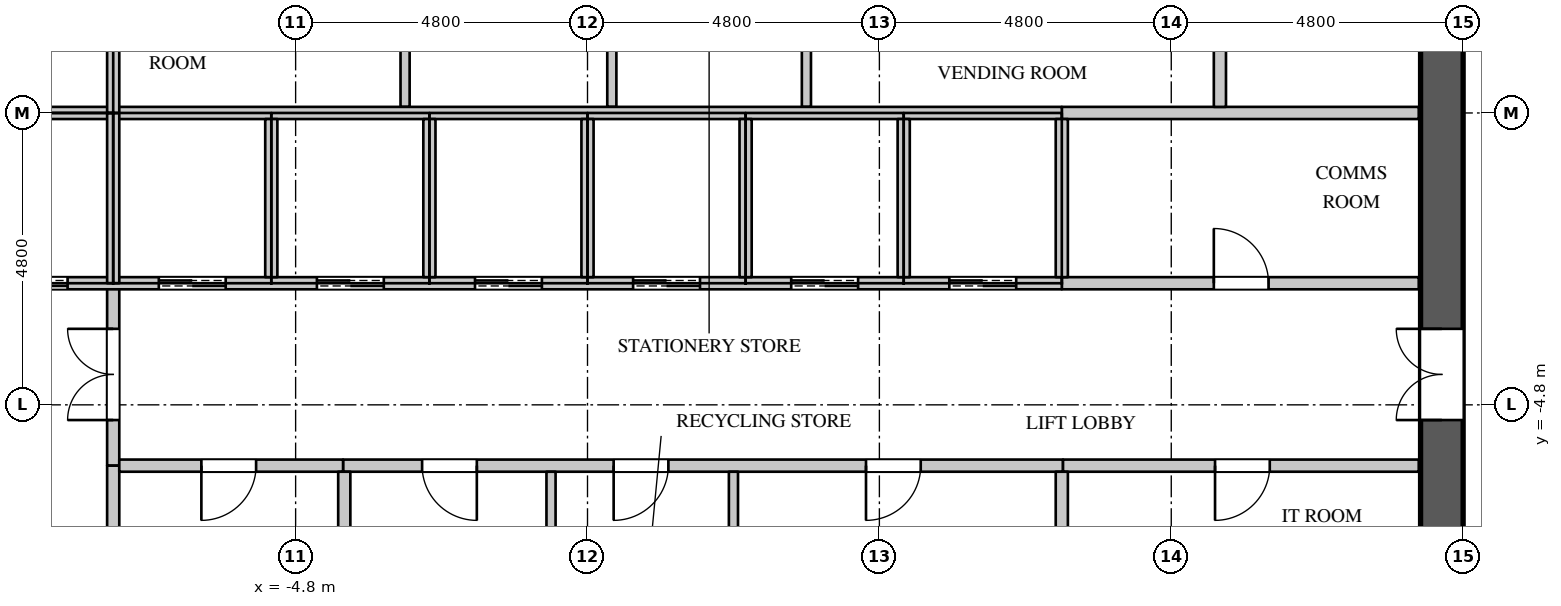
"""IFC4 building model, lengths in metres.
Left out: names, types, materials, properties, quantities, classifications, styles, units other than length and angle.
Written with IfcOpenShell. Run it as: python <this file> out.ifc"""

import sys

from ifc_helpers import new_model, si_unit, direction, frame, frame_2d, origin, place, context, subcontext, project, spatial, rectangle, extrude, element, fill, save


model = new_model("IFC4")
c1 = context("Model", 3, precision=1e-05, world=origin(), true_north=direction((0.0, 1.0)))
c2 = subcontext(c1, "Body", "Model", "MODEL_VIEW")
j1 = project(units=[si_unit("LENGTHUNIT", "METRE"), si_unit("PLANEANGLEUNIT", "RADIAN")], contexts=[c1])
p1 = place(None, origin())
s1 = spatial("IfcSite", under=j1, at=p1, CompositionType="ELEMENT")
p2 = place(p1, origin())
s2 = spatial("IfcBuilding", under=s1, at=p2, CompositionType="ELEMENT")
p3 = place(p2, frame((0.0, 0.0, 174.9)))
s3 = spatial("IfcBuildingStorey", under=s2, at=p3, CompositionType="ELEMENT", Elevation=174.9)
p4 = place(p3, frame((14.05, -11.3, 0.0), z_axis=(0.0, 0.0, 1.0), x_axis=(0.0, 1.0, 0.0)))
e1 = element("IfcWall", 1, at=p4, inside=s3, PredefinedType="SHEAR", context=c2, shape_type="SweptSolid", body=[
    extrude(rectangle(XDim=22.6, YDim=0.7, at=frame_2d((11.3, 0.0))), origin(), (0.0, 0.0, 1.0), 4.2),
])
p5 = place(p4, frame((20.35, 0.0, 0.0)))
e2 = element("IfcOpeningElement", 2, at=p5, cuts=e1, PredefinedType="OPENING", context=c2, shape_type="SweptSolid", body=[
    extrude(rectangle(XDim=1.1, YDim=2.2, at=frame_2d((0.55, 1.1))), frame((0.0, 0.36, 0.0), z_axis=(0.0, -1.0, 0.0), x_axis=(1.0, 0.0, 0.0)), (0.0, 0.0, 1.0), 0.72),
])
p6 = place(p4, frame((1.15, 0.0, 0.0)))
e3 = element("IfcOpeningElement", 3, at=p6, cuts=e1, PredefinedType="OPENING", context=c2, shape_type="SweptSolid", body=[
    extrude(rectangle(XDim=1.1, YDim=2.2, at=frame_2d((0.55, 1.1))), frame((0.0, 0.36, 0.0), z_axis=(0.0, -1.0, 0.0), x_axis=(1.0, 0.0, 0.0)), (0.0, 0.0, 1.0), 0.72),
])
p7 = place(p4, frame((14.85, 0.0, 0.0)))
e4 = element("IfcOpeningElement", 4, at=p7, cuts=e1, PredefinedType="OPENING", context=c2, shape_type="SweptSolid", body=[
    extrude(rectangle(XDim=1.5, YDim=2.4, at=frame_2d((0.75, 1.2))), frame((0.0, 0.36, 0.0), z_axis=(0.0, -1.0, 0.0), x_axis=(1.0, 0.0, 0.0)), (0.0, 0.0, 1.0), 0.72),
])
p8 = place(p4, frame((6.25, 0.0, 0.0)))
e5 = element("IfcOpeningElement", 5, at=p8, cuts=e1, PredefinedType="OPENING", context=c2, shape_type="SweptSolid", body=[
    extrude(rectangle(XDim=1.5, YDim=2.4, at=frame_2d((0.75, 1.2))), frame((0.0, 0.36, 0.0), z_axis=(0.0, -1.0, 0.0), x_axis=(1.0, 0.0, 0.0)), (0.0, 0.0, 1.0), 0.72),
])
p9 = place(p3, frame((-7.8, -5.8, 0.0), z_axis=(0.0, 0.0, 1.0), x_axis=(0.0, 1.0, 0.0)))
e6 = element("IfcWall", 6, at=p9, inside=s3, PredefinedType="PARTITIONING", context=c2, shape_type="SweptSolid", body=[
    extrude(rectangle(XDim=3.0, YDim=0.2, at=frame_2d((1.5, 0.0))), origin(), (0.0, 0.0, 1.0), 3.95),
])
p10 = place(p9, frame((0.75, 0.0, 0.0)))
e7 = element("IfcOpeningElement", 7, at=p10, cuts=e6, PredefinedType="OPENING", context=c2, shape_type="SweptSolid", body=[
    extrude(rectangle(XDim=1.5, YDim=2.4, at=frame_2d((0.75, 1.2))), frame((0.0, 0.11, 0.0), z_axis=(0.0, -1.0, 0.0), x_axis=(1.0, 0.0, 0.0)), (0.0, 0.0, 1.0), 0.22),
])
p11 = place(p3, frame((-4.02, -5.8, 0.0), z_axis=(0.0, 0.0, 1.0), x_axis=(1.0, 0.0, 0.0)))
e8 = element("IfcWall", 8, at=p11, inside=s3, PredefinedType="PARTITIONING", context=c2, shape_type="SweptSolid", body=[
    extrude(rectangle(XDim=11.84, YDim=0.2, at=frame_2d((5.92, 0.0))), origin(), (0.0, 0.0, 1.0), 3.95),
])
p12 = place(p11, frame((1.3, 0.0, 0.0)))
e9 = element("IfcOpeningElement", 9, at=p12, cuts=e8, PredefinedType="OPENING", context=c2, shape_type="SweptSolid", body=[
    extrude(rectangle(XDim=0.9, YDim=2.2, at=frame_2d((0.45, 1.1))), frame((0.0, 0.11, 0.0), z_axis=(0.0, -1.0, 0.0), x_axis=(1.0, 0.0, 0.0)), (0.0, 0.0, 1.0), 0.22),
])
p13 = place(p11, frame((4.45, 0.0, 0.0)))
e10 = element("IfcOpeningElement", 10, at=p13, cuts=e8, PredefinedType="OPENING", context=c2, shape_type="SweptSolid", body=[
    extrude(rectangle(XDim=0.9, YDim=2.2, at=frame_2d((0.45, 1.1))), frame((0.0, 0.11, 0.0), z_axis=(0.0, -1.0, 0.0), x_axis=(1.0, 0.0, 0.0)), (0.0, 0.0, 1.0), 0.22),
])
p14 = place(p11, frame((8.6, 0.0, 0.0)))
e11 = element("IfcOpeningElement", 11, at=p14, cuts=e8, PredefinedType="OPENING", context=c2, shape_type="SweptSolid", body=[
    extrude(rectangle(XDim=0.9, YDim=2.2, at=frame_2d((0.45, 1.1))), frame((0.0, 0.11, 0.0), z_axis=(0.0, -1.0, 0.0), x_axis=(1.0, 0.0, 0.0)), (0.0, 0.0, 1.0), 0.22),
])
p15 = place(p3, frame((-3.0, 0.1, 0.0), z_axis=(0.0, 0.0, 1.0), x_axis=(0.0, 1.0, 0.0)))
e12 = element("IfcWall", 12, at=p15, inside=s3, PredefinedType="PARTITIONING", context=c2, shape_type="SweptSolid", body=[
    extrude(rectangle(XDim=2.6, YDim=0.15, at=frame_2d((1.3, 0.0))), origin(), (0.0, 0.0, 1.0), 3.95),
])
p16 = place(p3, frame((-0.6, -11.27, 0.0), z_axis=(0.0, 0.0, 1.0), x_axis=(0.0, 1.0, 0.0)))
e13 = element("IfcWall", 13, at=p16, inside=s3, PredefinedType="PARTITIONING", context=c2, shape_type="SweptSolid", body=[
    extrude(rectangle(XDim=5.37, YDim=0.15, at=frame_2d((2.685, 0.0))), origin(), (0.0, 0.0, 1.0), 3.95),
])
p17 = place(p3, frame((0.4, 0.1, 0.0), z_axis=(0.0, 0.0, 1.0), x_axis=(0.0, 1.0, 0.0)))
e14 = element("IfcWall", 14, at=p17, inside=s3, PredefinedType="PARTITIONING", context=c2, shape_type="SweptSolid", body=[
    extrude(rectangle(XDim=2.6, YDim=0.15, at=frame_2d((1.3, 0.0))), origin(), (0.0, 0.0, 1.0), 3.95),
])
p18 = place(p3, frame((2.4, -11.27, 0.0), z_axis=(0.0, 0.0, 1.0), x_axis=(0.0, 1.0, 0.0)))
e15 = element("IfcWall", 15, at=p18, inside=s3, PredefinedType="PARTITIONING", context=c2, shape_type="SweptSolid", body=[
    extrude(rectangle(XDim=5.37, YDim=0.15, at=frame_2d((2.685, 0.0))), origin(), (0.0, 0.0, 1.0), 3.95),
])
p19 = place(p3, frame((3.6, 0.1, 0.0), z_axis=(0.0, 0.0, 1.0), x_axis=(0.0, 1.0, 0.0)))
e16 = element("IfcWall", 16, at=p19, inside=s3, PredefinedType="PARTITIONING", context=c2, shape_type="SweptSolid", body=[
    extrude(rectangle(XDim=2.6, YDim=0.15, at=frame_2d((1.3, 0.0))), origin(), (0.0, 0.0, 1.0), 3.95),
])
p20 = place(p3, frame((-7.8, -8.075, 0.0), z_axis=(0.0, 0.0, 1.0), x_axis=(0.0, 1.0, 0.0)))
e17 = element("IfcWall", 17, at=p20, inside=s3, PredefinedType="PARTITIONING", context=c2, shape_type="SweptSolid", body=[
    extrude(rectangle(XDim=2.275, YDim=0.2, at=frame_2d((1.137, 0.0))), origin(), (0.0, 0.0, 1.0), 3.95),
])
p21 = place(p3, frame((-7.7, -5.8, 0.0), z_axis=(0.0, 0.0, 1.0), x_axis=(1.0, 0.0, 0.0)))
e18 = element("IfcWall", 18, at=p21, inside=s3, PredefinedType="PARTITIONING", context=c2, shape_type="SweptSolid", body=[
    extrude(rectangle(XDim=3.68, YDim=0.2, at=frame_2d((1.84, 0.0))), origin(), (0.0, 0.0, 1.0), 3.95),
])
p22 = place(p21, frame((1.35, 0.0, 0.0)))
e19 = element("IfcOpeningElement", 19, at=p22, cuts=e18, PredefinedType="OPENING", context=c2, shape_type="SweptSolid", body=[
    extrude(rectangle(XDim=0.9, YDim=2.2, at=frame_2d((0.45, 1.1))), frame((0.0, 0.11, 0.0), z_axis=(0.0, -1.0, 0.0), x_axis=(1.0, 0.0, 0.0)), (0.0, 0.0, 1.0), 0.22),
])
p23 = place(p3, frame((-4.0, -11.27, 0.0), z_axis=(0.0, 0.0, 1.0), x_axis=(0.0, 1.0, 0.0)))
e20 = element("IfcWall", 20, at=p23, inside=s3, PredefinedType="PARTITIONING", context=c2, shape_type="SweptSolid", body=[
    extrude(rectangle(XDim=5.37, YDim=0.2, at=frame_2d((2.685, 0.0))), origin(), (0.0, 0.0, 1.0), 3.95),
])
p24 = place(p3, frame((7.82, -5.8, 0.0), z_axis=(0.0, 0.0, 1.0), x_axis=(1.0, 0.0, 0.0)))
e21 = element("IfcWall", 21, at=p24, inside=s3, PredefinedType="PARTITIONING", context=c2, shape_type="SweptSolid", body=[
    extrude(rectangle(XDim=5.85, YDim=0.2, at=frame_2d((2.925, 0.0))), origin(), (0.0, 0.0, 1.0), 3.95),
])
p25 = place(p24, frame((2.5, 0.0, 0.0)))
e22 = element("IfcOpeningElement", 22, at=p25, cuts=e21, PredefinedType="OPENING", context=c2, shape_type="SweptSolid", body=[
    extrude(rectangle(XDim=0.9, YDim=2.2, at=frame_2d((0.45, 1.1))), frame((0.0, 0.11, 0.0), z_axis=(0.0, -1.0, 0.0), x_axis=(1.0, 0.0, 0.0)), (0.0, 0.0, 1.0), 0.22),
])
p26 = place(p3, frame((7.8, -2.8, 0.0), z_axis=(0.0, 0.0, 1.0), x_axis=(1.0, 0.0, 0.0)))
e23 = element("IfcWall", 23, at=p26, inside=s3, PredefinedType="PARTITIONING", context=c2, shape_type="SweptSolid", body=[
    extrude(rectangle(XDim=5.87, YDim=0.2, at=frame_2d((2.935, 0.0))), origin(), (0.0, 0.0, 1.0), 3.95),
])
p27 = place(p26, frame((2.5, 0.0, 0.0)))
e24 = element("IfcOpeningElement", 24, at=p27, cuts=e23, PredefinedType="OPENING", context=c2, shape_type="SweptSolid", body=[
    extrude(rectangle(XDim=0.9, YDim=2.2, at=frame_2d((0.45, 1.1))), frame((0.0, 0.11, 0.0), z_axis=(0.0, -1.0, 0.0), x_axis=(1.0, 0.0, 0.0)), (0.0, 0.0, 1.0), 0.22),
])
p28 = place(p3, frame((7.8, -8.075, 0.0), z_axis=(0.0, 0.0, 1.0), x_axis=(0.0, 1.0, 0.0)))
e25 = element("IfcWall", 25, at=p28, inside=s3, PredefinedType="PARTITIONING", context=c2, shape_type="SweptSolid", body=[
    extrude(rectangle(XDim=2.175, YDim=0.2, at=frame_2d((1.087, 0.0))), origin(), (0.0, 0.0, 1.0), 3.95),
])
p29 = place(p3, frame((7.8, 0.0, 0.0), z_axis=(0.0, 0.0, 1.0), x_axis=(1.0, 0.0, 0.0)))
e26 = element("IfcWall", 26, at=p29, inside=s3, PredefinedType="PARTITIONING", context=c2, shape_type="SweptSolid", body=[
    extrude(rectangle(XDim=5.87, YDim=0.2, at=frame_2d((2.935, 0.0))), origin(), (0.0, 0.0, 1.0), 3.95),
])
p30 = place(p3, frame((10.4, 0.1, 0.0), z_axis=(0.0, 0.0, 1.0), x_axis=(0.0, 1.0, 0.0)))
e27 = element("IfcWall", 27, at=p30, inside=s3, PredefinedType="PARTITIONING", context=c2, shape_type="SweptSolid", body=[
    extrude(rectangle(XDim=2.6, YDim=0.2, at=frame_2d((1.3, 0.0))), origin(), (0.0, 0.0, 1.0), 3.95),
])
p31 = place(p3, frame((-13.67, 0.0, 0.0), z_axis=(0.0, 0.0, 1.0), x_axis=(1.0, 0.0, 0.0)))
e28 = element("IfcWall", 28, at=p31, inside=s3, PredefinedType="PARTITIONING", context=c2, shape_type="SweptSolid", body=[
    extrude(rectangle(XDim=21.47, YDim=0.2, at=frame_2d((10.735, 0.0))), origin(), (0.0, 0.0, 1.0), 3.95),
])
p32 = place(p3, frame((-10.4, -2.8, 0.0), z_axis=(0.0, 0.0, 1.0), x_axis=(1.0, 0.0, 0.0)))
e29 = element("IfcWall", 29, at=p32, inside=s3, PredefinedType="PARTITIONING", context=c2, shape_type="SweptSolid", body=[
    extrude(rectangle(XDim=18.2, YDim=0.2, at=frame_2d((9.1, 0.0))), origin(), (0.0, 0.0, 1.0), 3.95),
])
p33 = place(p32, frame((0.75, 0.0, 0.0)))
e30 = element("IfcOpeningElement", 30, at=p33, cuts=e29, PredefinedType="OPENING", context=c2, shape_type="SweptSolid", body=[
    extrude(rectangle(XDim=1.1, YDim=2.2, at=frame_2d((0.55, 1.1))), frame((0.0, 0.11, 0.0), z_axis=(0.0, -1.0, 0.0), x_axis=(1.0, 0.0, 0.0)), (0.0, 0.0, 1.0), 0.22),
])
p34 = place(p32, frame((3.35, 0.0, 0.0)))
e31 = element("IfcOpeningElement", 31, at=p34, cuts=e29, PredefinedType="OPENING", context=c2, shape_type="SweptSolid", body=[
    extrude(rectangle(XDim=1.1, YDim=2.2, at=frame_2d((0.55, 1.1))), frame((0.0, 0.11, 0.0), z_axis=(0.0, -1.0, 0.0), x_axis=(1.0, 0.0, 0.0)), (0.0, 0.0, 1.0), 0.22),
])
p35 = place(p32, frame((5.95, 0.0, 0.0)))
e32 = element("IfcOpeningElement", 32, at=p35, cuts=e29, PredefinedType="OPENING", context=c2, shape_type="SweptSolid", body=[
    extrude(rectangle(XDim=1.1, YDim=2.2, at=frame_2d((0.55, 1.1))), frame((0.0, 0.11, 0.0), z_axis=(0.0, -1.0, 0.0), x_axis=(1.0, 0.0, 0.0)), (0.0, 0.0, 1.0), 0.22),
])
p36 = place(p32, frame((8.55, 0.0, 0.0)))
e33 = element("IfcOpeningElement", 33, at=p36, cuts=e29, PredefinedType="OPENING", context=c2, shape_type="SweptSolid", body=[
    extrude(rectangle(XDim=1.1, YDim=2.2, at=frame_2d((0.55, 1.1))), frame((0.0, 0.11, 0.0), z_axis=(0.0, -1.0, 0.0), x_axis=(1.0, 0.0, 0.0)), (0.0, 0.0, 1.0), 0.22),
])
p37 = place(p32, frame((11.15, 0.0, 0.0)))
e34 = element("IfcOpeningElement", 34, at=p37, cuts=e29, PredefinedType="OPENING", context=c2, shape_type="SweptSolid", body=[
    extrude(rectangle(XDim=1.1, YDim=2.2, at=frame_2d((0.55, 1.1))), frame((0.0, 0.11, 0.0), z_axis=(0.0, -1.0, 0.0), x_axis=(1.0, 0.0, 0.0)), (0.0, 0.0, 1.0), 0.22),
])
p38 = place(p32, frame((13.75, 0.0, 0.0)))
e35 = element("IfcOpeningElement", 35, at=p38, cuts=e29, PredefinedType="OPENING", context=c2, shape_type="SweptSolid", body=[
    extrude(rectangle(XDim=1.1, YDim=2.2, at=frame_2d((0.55, 1.1))), frame((0.0, 0.11, 0.0), z_axis=(0.0, -1.0, 0.0), x_axis=(1.0, 0.0, 0.0)), (0.0, 0.0, 1.0), 0.22),
])
p39 = place(p32, frame((16.35, 0.0, 0.0)))
e36 = element("IfcOpeningElement", 36, at=p39, cuts=e29, PredefinedType="OPENING", context=c2, shape_type="SweptSolid", body=[
    extrude(rectangle(XDim=1.1, YDim=2.2, at=frame_2d((0.55, 1.1))), frame((0.0, 0.11, 0.0), z_axis=(0.0, -1.0, 0.0), x_axis=(1.0, 0.0, 0.0)), (0.0, 0.0, 1.0), 0.22),
])
for number, where, z_axis, x_axis in (
    (37, (-7.8, -2.8, 0.0), (0.0, 0.0, 1.0), (0.0, 1.0, 0.0)),
    (38, (-7.8, 0.0, 0.0), (0.0, 0.0, 1.0), (0.0, 1.0, 0.0)),
):
    element("IfcWall", number, at=place(p3, frame(where, z_axis=z_axis, x_axis=x_axis)), inside=s3, PredefinedType="PARTITIONING", context=c2, shape_type="SweptSolid", body=[
        extrude(rectangle(XDim=2.8, YDim=0.2, at=frame_2d((1.4, 0.0))), origin(), (0.0, 0.0, 1.0), 3.95),
    ])
for number, where, z_axis, x_axis in (
    (39, (-5.2, -2.7, 0.0), (0.0, 0.0, 1.0), (0.0, 1.0, 0.0)),
    (40, (-2.6, -2.7, 0.0), (0.0, 0.0, 1.0), (0.0, 1.0, 0.0)),
    (41, (0.0, -2.7, 0.0), (0.0, 0.0, 1.0), (0.0, 1.0, 0.0)),
    (42, (2.6, -2.7, 0.0), (0.0, 0.0, 1.0), (0.0, 1.0, 0.0)),
    (43, (5.2, -2.7, 0.0), (0.0, 0.0, 1.0), (0.0, 1.0, 0.0)),
    (44, (7.8, -2.7, 0.0), (0.0, 0.0, 1.0), (0.0, 1.0, 0.0)),
):
    element("IfcWall", number, at=place(p3, frame(where, z_axis=z_axis, x_axis=x_axis)), inside=s3, PredefinedType="PARTITIONING", context=c2, shape_type="SweptSolid", body=[
        extrude(rectangle(XDim=2.6, YDim=0.2, at=frame_2d((1.3, 0.0))), origin(), (0.0, 0.0, 1.0), 3.95),
    ])
p40 = place(p27, origin())
e45 = element("IfcDoor", 45, at=p40, inside=s3, OperationType="SINGLE_SWING_LEFT", PredefinedType="DOOR", context=c2, shape_type="SweptSolid", body=[
    extrude(rectangle(XDim=0.9, YDim=2.2, at=frame_2d((0.45, 1.1))), frame((0.0, 0.025, 0.0), z_axis=(0.0, -1.0, 0.0), x_axis=(1.0, 0.0, 0.0)), (0.0, 0.0, 1.0), 0.05),
])
fill(e24, e45)
p41 = place(p22, origin())
e46 = element("IfcDoor", 46, at=p41, inside=s3, OperationType="SINGLE_SWING_RIGHT", PredefinedType="DOOR", context=c2, shape_type="SweptSolid", body=[
    extrude(rectangle(XDim=0.9, YDim=2.2, at=frame_2d((0.45, 1.1))), frame((0.0, 0.025, 0.0), z_axis=(0.0, -1.0, 0.0), x_axis=(1.0, 0.0, 0.0)), (0.0, 0.0, 1.0), 0.05),
])
fill(e19, e46)
p42 = place(p12, origin())
e47 = element("IfcDoor", 47, at=p42, inside=s3, OperationType="SINGLE_SWING_LEFT", PredefinedType="DOOR", context=c2, shape_type="SweptSolid", body=[
    extrude(rectangle(XDim=0.9, YDim=2.2, at=frame_2d((0.45, 1.1))), frame((0.0, 0.025, 0.0), z_axis=(0.0, -1.0, 0.0), x_axis=(1.0, 0.0, 0.0)), (0.0, 0.0, 1.0), 0.05),
])
fill(e9, e47)
p43 = place(p13, origin())
e48 = element("IfcDoor", 48, at=p43, inside=s3, OperationType="SINGLE_SWING_RIGHT", PredefinedType="DOOR", context=c2, shape_type="SweptSolid", body=[
    extrude(rectangle(XDim=0.9, YDim=2.2, at=frame_2d((0.45, 1.1))), frame((0.0, 0.025, 0.0), z_axis=(0.0, -1.0, 0.0), x_axis=(1.0, 0.0, 0.0)), (0.0, 0.0, 1.0), 0.05),
])
fill(e10, e48)
p44 = place(p14, origin())
e49 = element("IfcDoor", 49, at=p44, inside=s3, OperationType="SINGLE_SWING_RIGHT", PredefinedType="DOOR", context=c2, shape_type="SweptSolid", body=[
    extrude(rectangle(XDim=0.9, YDim=2.2, at=frame_2d((0.45, 1.1))), frame((0.0, 0.025, 0.0), z_axis=(0.0, -1.0, 0.0), x_axis=(1.0, 0.0, 0.0)), (0.0, 0.0, 1.0), 0.05),
])
fill(e11, e49)
p45 = place(p25, origin())
e50 = element("IfcDoor", 50, at=p45, inside=s3, OperationType="SINGLE_SWING_RIGHT", PredefinedType="DOOR", context=c2, shape_type="SweptSolid", body=[
    extrude(rectangle(XDim=0.9, YDim=2.2, at=frame_2d((0.45, 1.1))), frame((0.0, 0.025, 0.0), z_axis=(0.0, -1.0, 0.0), x_axis=(1.0, 0.0, 0.0)), (0.0, 0.0, 1.0), 0.05),
])
fill(e22, e50)
p46 = place(p33, origin())
e51 = element("IfcDoor", 51, at=p46, inside=s3, OperationType="DOUBLE_DOOR_SLIDING", PredefinedType="DOOR", context=c2, shape_type="SweptSolid", body=[
    extrude(rectangle(XDim=1.1, YDim=2.2, at=frame_2d((0.55, 1.1))), frame((0.0, 0.025, 0.0), z_axis=(0.0, -1.0, 0.0), x_axis=(1.0, 0.0, 0.0)), (0.0, 0.0, 1.0), 0.05),
])
fill(e30, e51)
p47 = place(p34, origin())
e52 = element("IfcDoor", 52, at=p47, inside=s3, OperationType="DOUBLE_DOOR_SLIDING", PredefinedType="DOOR", context=c2, shape_type="SweptSolid", body=[
    extrude(rectangle(XDim=1.1, YDim=2.2, at=frame_2d((0.55, 1.1))), frame((0.0, 0.025, 0.0), z_axis=(0.0, -1.0, 0.0), x_axis=(1.0, 0.0, 0.0)), (0.0, 0.0, 1.0), 0.05),
])
fill(e31, e52)
p48 = place(p35, origin())
e53 = element("IfcDoor", 53, at=p48, inside=s3, OperationType="DOUBLE_DOOR_SLIDING", PredefinedType="DOOR", context=c2, shape_type="SweptSolid", body=[
    extrude(rectangle(XDim=1.1, YDim=2.2, at=frame_2d((0.55, 1.1))), frame((0.0, 0.025, 0.0), z_axis=(0.0, -1.0, 0.0), x_axis=(1.0, 0.0, 0.0)), (0.0, 0.0, 1.0), 0.05),
])
fill(e32, e53)
p49 = place(p36, origin())
e54 = element("IfcDoor", 54, at=p49, inside=s3, OperationType="DOUBLE_DOOR_SLIDING", PredefinedType="DOOR", context=c2, shape_type="SweptSolid", body=[
    extrude(rectangle(XDim=1.1, YDim=2.2, at=frame_2d((0.55, 1.1))), frame((0.0, 0.025, 0.0), z_axis=(0.0, -1.0, 0.0), x_axis=(1.0, 0.0, 0.0)), (0.0, 0.0, 1.0), 0.05),
])
fill(e33, e54)
p50 = place(p37, origin())
e55 = element("IfcDoor", 55, at=p50, inside=s3, OperationType="DOUBLE_DOOR_SLIDING", PredefinedType="DOOR", context=c2, shape_type="SweptSolid", body=[
    extrude(rectangle(XDim=1.1, YDim=2.2, at=frame_2d((0.55, 1.1))), frame((0.0, 0.025, 0.0), z_axis=(0.0, -1.0, 0.0), x_axis=(1.0, 0.0, 0.0)), (0.0, 0.0, 1.0), 0.05),
])
fill(e34, e55)
p51 = place(p38, origin())
e56 = element("IfcDoor", 56, at=p51, inside=s3, OperationType="DOUBLE_DOOR_SLIDING", PredefinedType="DOOR", context=c2, shape_type="SweptSolid", body=[
    extrude(rectangle(XDim=1.1, YDim=2.2, at=frame_2d((0.55, 1.1))), frame((0.0, 0.025, 0.0), z_axis=(0.0, -1.0, 0.0), x_axis=(1.0, 0.0, 0.0)), (0.0, 0.0, 1.0), 0.05),
])
fill(e35, e56)
p52 = place(p39, origin())
e57 = element("IfcDoor", 57, at=p52, inside=s3, OperationType="DOUBLE_DOOR_SLIDING", PredefinedType="DOOR", context=c2, shape_type="SweptSolid", body=[
    extrude(rectangle(XDim=1.1, YDim=2.2, at=frame_2d((0.55, 1.1))), frame((0.0, 0.025, 0.0), z_axis=(0.0, -1.0, 0.0), x_axis=(1.0, 0.0, 0.0)), (0.0, 0.0, 1.0), 0.05),
])
fill(e36, e57)
p53 = place(p10, origin())
e58 = element("IfcDoor", 58, at=p53, inside=s3, OperationType="DOUBLE_DOOR_SINGLE_SWING", PredefinedType="DOOR", context=c2, shape_type="SweptSolid", body=[
    extrude(rectangle(XDim=1.5, YDim=2.4, at=frame_2d((0.75, 1.2))), frame((0.0, 0.025, 0.0), z_axis=(0.0, -1.0, 0.0), x_axis=(1.0, 0.0, 0.0)), (0.0, 0.0, 1.0), 0.05),
])
fill(e7, e58)
p54 = place(p8, origin())
e59 = element("IfcDoor", 59, at=p54, inside=s3, OperationType="DOUBLE_DOOR_SINGLE_SWING", PredefinedType="DOOR", context=c2, shape_type="SweptSolid", body=[
    extrude(rectangle(XDim=1.5, YDim=2.4, at=frame_2d((0.75, 1.2))), frame((0.0, 0.345, 0.0), z_axis=(0.0, -1.0, 0.0), x_axis=(1.0, 0.0, 0.0)), (0.0, 0.0, 1.0), 0.05),
])
fill(e5, e59)
save(model, sys.argv[1])
